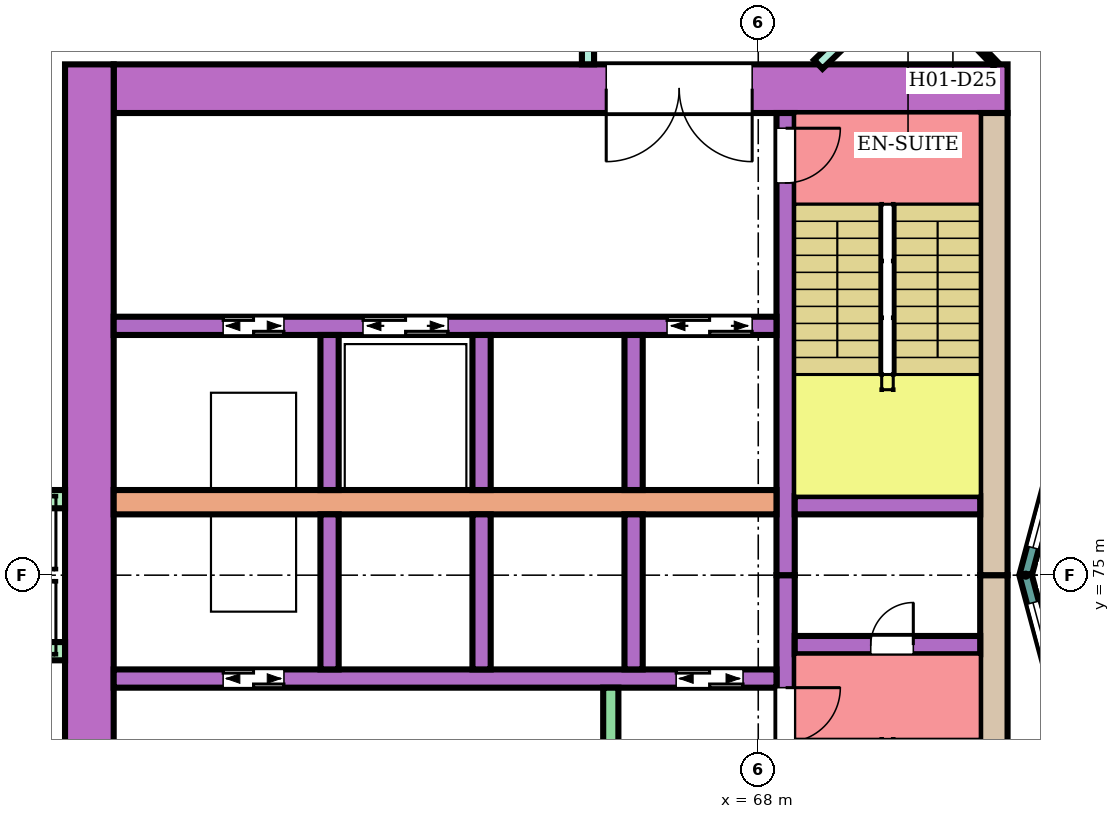
"""IFC4 building model, lengths in metres.
Left out: names, types, materials, properties, quantities, classifications, styles, units other than length and angle.
Written with IfcOpenShell. Run it as: python <this file> out.ifc"""

import sys

from ifc_helpers import new_model, si_unit, direction, frame, frame_2d, origin, place, context, subcontext, project, spatial, rectangle, extrude, element, fill, save


model = new_model("IFC4")
c1 = context("Model", 3, precision=1e-05, world=origin(), true_north=direction((0.0, 1.0)))
c2 = subcontext(c1, "Body", "Model", "MODEL_VIEW")
j1 = project(units=[si_unit("LENGTHUNIT", "METRE"), si_unit("PLANEANGLEUNIT", "RADIAN")], contexts=[c1])
p1 = place(None, origin())
s1 = spatial("IfcSite", under=j1, at=p1, CompositionType="ELEMENT")
p2 = place(p1, origin())
s2 = spatial("IfcBuilding", under=s1, at=p2, CompositionType="ELEMENT")
p3 = place(p2, frame((0.0, 0.0, 28.8)))
s3 = spatial("IfcBuildingStorey", under=s2, at=p3, CompositionType="ELEMENT", Elevation=28.8)
p4 = place(p3, frame((72.1, 83.0, 0.0), z_axis=(0.0, 0.0, 1.0), x_axis=(-1.0, 0.0, 0.0)))
e1 = element("IfcWall", 1, at=p4, inside=s3, PredefinedType="SHEAR", context=c2, shape_type="SweptSolid", body=[
    extrude(rectangle(XDim=14.7, YDim=0.8, at=frame_2d((7.35, 0.0))), origin(), (0.0, 0.0, 1.0), 3.48),
])
p5 = place(p4, frame((4.2, 0.0, 0.0)))
e2 = element("IfcOpeningElement", 2, at=p5, cuts=e1, PredefinedType="OPENING", context=c2, shape_type="SweptSolid", body=[
    extrude(rectangle(XDim=2.4, YDim=2.4, at=frame_2d((1.2, 1.2))), frame((0.0, 0.41, 0.0), z_axis=(0.0, -1.0, 0.0), x_axis=(1.0, 0.0, 0.0)), (0.0, 0.0, 1.0), 0.82),
])
for number, where, z_axis, x_axis in (
    (3, (71.875, 75.0, 0.0), (0.0, 0.0, 1.0), (0.0, -1.0, 0.0)),
    (4, (71.875, 82.6, 0.0), (0.0, 0.0, 1.0), (0.0, -1.0, 0.0)),
):
    element("IfcWall", number, at=place(p3, frame(where, z_axis=z_axis, x_axis=x_axis)), inside=s3, PredefinedType="SHEAR", context=c2, shape_type="SweptSolid", body=[
        extrude(rectangle(XDim=7.6, YDim=0.45, at=frame_2d((3.8, 0.0))), origin(), (0.0, 0.0, 1.0), 3.48),
    ])
p6 = place(p3, frame((57.0, 83.4, 0.0), z_axis=(0.0, 0.0, 1.0), x_axis=(0.0, -1.0, 0.0)))
e5 = element("IfcWall", 5, at=p6, inside=s3, PredefinedType="SHEAR", context=c2, shape_type="SweptSolid", body=[
    extrude(rectangle(XDim=16.8, YDim=0.8, at=frame_2d((8.4, 0.0))), origin(), (0.0, 0.0, 1.0), 3.48),
])
p7 = place(p3, frame((68.45, 75.0, 0.0), z_axis=(0.0, 0.0, 1.0), x_axis=(0.0, -1.0, 0.0)))
e6 = element("IfcWall", 6, at=p7, inside=s3, PredefinedType="SHEAR", context=c2, shape_type="SweptSolid", body=[
    extrude(rectangle(XDim=7.6, YDim=0.3, at=frame_2d((3.8, 0.0))), origin(), (0.0, 0.0, 1.0), 3.48),
])
p8 = place(p7, frame((1.85, 0.0, 0.0)))
e7 = element("IfcOpeningElement", 7, at=p8, cuts=e6, PredefinedType="OPENING", context=c2, shape_type="SweptSolid", body=[
    extrude(rectangle(XDim=0.9, YDim=2.1, at=frame_2d((0.45, 1.05))), frame((0.0, 0.16, 0.0), z_axis=(0.0, -1.0, 0.0), x_axis=(1.0, 0.0, 0.0)), (0.0, 0.0, 1.0), 0.32),
])
p9 = place(p3, frame((68.45, 82.6, 0.0), z_axis=(0.0, 0.0, 1.0), x_axis=(0.0, -1.0, 0.0)))
e8 = element("IfcWall", 8, at=p9, inside=s3, PredefinedType="SHEAR", context=c2, shape_type="SweptSolid", body=[
    extrude(rectangle(XDim=7.6, YDim=0.3, at=frame_2d((3.8, 0.0))), origin(), (0.0, 0.0, 1.0), 3.48),
])
p10 = place(p9, frame((0.25, 0.0, 0.0)))
e9 = element("IfcOpeningElement", 9, at=p10, cuts=e8, PredefinedType="OPENING", context=c2, shape_type="SweptSolid", body=[
    extrude(rectangle(XDim=0.9, YDim=2.1, at=frame_2d((0.45, 1.05))), frame((0.0, 0.16, 0.0), z_axis=(0.0, -1.0, 0.0), x_axis=(1.0, 0.0, 0.0)), (0.0, 0.0, 1.0), 0.32),
])
p11 = place(p3, frame((71.65, 73.85, 0.0), z_axis=(0.0, 0.0, 1.0), x_axis=(-1.0, 0.0, 0.0)))
e10 = element("IfcWall", 10, at=p11, inside=s3, PredefinedType="SHEAR", context=c2, shape_type="SweptSolid", body=[
    extrude(rectangle(XDim=3.05, YDim=0.3, at=frame_2d((1.525, 0.0))), origin(), (0.0, 0.0, 1.0), 3.48),
])
p12 = place(p11, frame((1.1, 0.0, 0.0)))
e11 = element("IfcOpeningElement", 11, at=p12, cuts=e10, PredefinedType="OPENING", context=c2, shape_type="SweptSolid", body=[
    extrude(rectangle(XDim=0.7, YDim=2.0, at=frame_2d((0.35, 1.0))), frame((0.0, 0.16, 0.0), z_axis=(0.0, -1.0, 0.0), x_axis=(1.0, 0.0, 0.0)), (0.0, 0.0, 1.0), 0.32),
])
p13 = place(p3, frame((71.65, 76.15, 0.0), z_axis=(0.0, 0.0, 1.0), x_axis=(-1.0, 0.0, 0.0)))
e12 = element("IfcWall", 12, at=p13, inside=s3, PredefinedType="SHEAR", context=c2, shape_type="SweptSolid", body=[
    extrude(rectangle(XDim=3.05, YDim=0.3, at=frame_2d((1.525, 0.0))), origin(), (0.0, 0.0, 1.0), 3.48),
])
p14 = place(p3, frame((68.3, 73.3, 0.0), z_axis=(0.0, 0.0, 1.0), x_axis=(-1.0, 0.0, 0.0)))
e13 = element("IfcWall", 13, at=p14, inside=s3, PredefinedType="SHEAR", context=c2, shape_type="SweptSolid", body=[
    extrude(rectangle(XDim=10.9, YDim=0.3, at=frame_2d((5.45, 0.0))), origin(), (0.0, 0.0, 1.0), 3.48),
])
p15 = place(p14, frame((0.55, 0.0, 0.0)))
e14 = element("IfcOpeningElement", 14, at=p15, cuts=e13, PredefinedType="OPENING", context=c2, shape_type="SweptSolid", body=[
    extrude(rectangle(XDim=1.1, YDim=2.1, at=frame_2d((0.55, 1.05))), frame((0.0, 0.16, 0.0), z_axis=(0.0, -1.0, 0.0), x_axis=(1.0, 0.0, 0.0)), (0.0, 0.0, 1.0), 0.32),
])
p16 = place(p14, frame((8.1, 0.0, 0.0)))
e15 = element("IfcOpeningElement", 15, at=p16, cuts=e13, PredefinedType="OPENING", context=c2, shape_type="SweptSolid", body=[
    extrude(rectangle(XDim=1.0, YDim=2.1, at=frame_2d((0.5, 1.05))), frame((0.0, 0.16, 0.0), z_axis=(0.0, -1.0, 0.0), x_axis=(1.0, 0.0, 0.0)), (0.0, 0.0, 1.0), 0.32),
])
p17 = place(p3, frame((68.3, 76.2, 0.0), z_axis=(0.0, 0.0, 1.0), x_axis=(-1.0, 0.0, 0.0)))
e16 = element("IfcWall", 16, at=p17, inside=s3, PredefinedType="SHEAR", context=c2, shape_type="SweptSolid", body=[
    extrude(rectangle(XDim=10.9, YDim=0.4, at=frame_2d((5.45, 0.0))), origin(), (0.0, 0.0, 1.0), 3.48),
])
p18 = place(p3, frame((68.3, 79.1, 0.0), z_axis=(0.0, 0.0, 1.0), x_axis=(-1.0, 0.0, 0.0)))
e17 = element("IfcWall", 17, at=p18, inside=s3, PredefinedType="SHEAR", context=c2, shape_type="SweptSolid", body=[
    extrude(rectangle(XDim=10.9, YDim=0.3, at=frame_2d((5.45, 0.0))), origin(), (0.0, 0.0, 1.0), 3.48),
])
p19 = place(p18, frame((0.4, 0.0, 0.0)))
e18 = element("IfcOpeningElement", 18, at=p19, cuts=e17, PredefinedType="OPENING", context=c2, shape_type="SweptSolid", body=[
    extrude(rectangle(XDim=1.4, YDim=2.1, at=frame_2d((0.7, 1.05))), frame((0.0, 0.16, 0.0), z_axis=(0.0, -1.0, 0.0), x_axis=(1.0, 0.0, 0.0)), (0.0, 0.0, 1.0), 0.32),
])
p20 = place(p18, frame((5.4, 0.0, 0.0)))
e19 = element("IfcOpeningElement", 19, at=p20, cuts=e17, PredefinedType="OPENING", context=c2, shape_type="SweptSolid", body=[
    extrude(rectangle(XDim=1.4, YDim=2.1, at=frame_2d((0.7, 1.05))), frame((0.0, 0.16, 0.0), z_axis=(0.0, -1.0, 0.0), x_axis=(1.0, 0.0, 0.0)), (0.0, 0.0, 1.0), 0.32),
])
p21 = place(p18, frame((8.1, 0.0, 0.0)))
e20 = element("IfcOpeningElement", 20, at=p21, cuts=e17, PredefinedType="OPENING", context=c2, shape_type="SweptSolid", body=[
    extrude(rectangle(XDim=1.0, YDim=2.1, at=frame_2d((0.5, 1.05))), frame((0.0, 0.16, 0.0), z_axis=(0.0, -1.0, 0.0), x_axis=(1.0, 0.0, 0.0)), (0.0, 0.0, 1.0), 0.32),
])
for number, where, z_axis, x_axis in (
    (21, (65.95, 76.0, 0.0), (0.0, 0.0, 1.0), (0.0, -1.0, 0.0)),
    (22, (63.45, 76.0, 0.0), (0.0, 0.0, 1.0), (0.0, -1.0, 0.0)),
    (23, (60.95, 76.0, 0.0), (0.0, 0.0, 1.0), (0.0, -1.0, 0.0)),
    (24, (65.95, 78.95, 0.0), (0.0, 0.0, 1.0), (0.0, -1.0, 0.0)),
    (25, (63.45, 78.95, 0.0), (0.0, 0.0, 1.0), (0.0, -1.0, 0.0)),
    (26, (60.95, 78.95, 0.0), (0.0, 0.0, 1.0), (0.0, -1.0, 0.0)),
):
    element("IfcWall", number, at=place(p3, frame(where, z_axis=z_axis, x_axis=x_axis)), inside=s3, PredefinedType="SHEAR", context=c2, shape_type="SweptSolid", body=[
        extrude(rectangle(XDim=2.55, YDim=0.3, at=frame_2d((1.275, 0.0))), origin(), (0.0, 0.0, 1.0), 3.48),
    ])
p22 = place(p3, frame((65.575, 73.15, 0.0), z_axis=(0.0, 0.0, 1.0), x_axis=(0.0, -1.0, 0.0)))
e27 = element("IfcWall", 27, at=p22, inside=s3, PredefinedType="SHEAR", context=c2, shape_type="SweptSolid", body=[
    extrude(rectangle(XDim=1.5, YDim=0.25, at=frame_2d((0.75, 0.0))), origin(), (0.0, 0.0, 1.0), 3.48),
])
p23 = place(p3, frame((57.571, 87.949, 0.0), z_axis=(0.0, 0.0, 1.0), x_axis=(-0.382694096902, -0.923875115043, 0.0)))
e28 = element("IfcWall", 28, at=p23, inside=s3, PredefinedType="NOTDEFINED", context=c2, shape_type="SweptSolid", body=[
    extrude(rectangle(XDim=6.761, YDim=0.2, at=frame_2d((3.38, 0.0))), origin(), (0.0, 0.0, 1.0), 3.8),
])
p24 = place(p23, frame((0.527, 0.0, 0.9)))
e29 = element("IfcOpeningElement", 29, at=p24, cuts=e28, PredefinedType="OPENING", context=c2, shape_type="SweptSolid", body=[
    extrude(rectangle(XDim=1.2, YDim=2.4, at=frame_2d((0.6, 1.2))), frame((0.0, 0.11, 0.0), z_axis=(0.0, -1.0, 0.0), x_axis=(1.0, 0.0, 0.0)), (0.0, 0.0, 1.0), 0.22),
])
p25 = place(p23, frame((2.48, 0.0, 0.0)))
e30 = element("IfcOpeningElement", 30, at=p25, cuts=e28, PredefinedType="OPENING", context=c2, shape_type="SweptSolid", body=[
    extrude(rectangle(XDim=1.8, YDim=2.4, at=frame_2d((0.9, 1.2))), frame((0.0, 0.11, 0.0), z_axis=(0.0, -1.0, 0.0), x_axis=(1.0, 0.0, 0.0)), (0.0, 0.0, 1.0), 0.22),
])
p26 = place(p23, frame((5.034, 0.0, 0.9)))
e31 = element("IfcOpeningElement", 31, at=p26, cuts=e28, PredefinedType="OPENING", context=c2, shape_type="SweptSolid", body=[
    extrude(rectangle(XDim=1.2, YDim=2.4, at=frame_2d((0.6, 1.2))), frame((0.0, 0.11, 0.0), z_axis=(0.0, -1.0, 0.0), x_axis=(1.0, 0.0, 0.0)), (0.0, 0.0, 1.0), 0.22),
])
for number, where, z_axis, x_axis in (
    (32, (56.6, 76.25, 0.0), (0.0, 0.0, 1.0), (-1.0, 0.0, 0.0)),
    (33, (56.6, 73.75, 0.0), (0.0, 0.0, 1.0), (-1.0, 0.0, 0.0)),
):
    element("IfcWall", number, at=place(p3, frame(where, z_axis=z_axis, x_axis=x_axis)), inside=s3, PredefinedType="NOTDEFINED", context=c2, shape_type="SweptSolid", body=[
        extrude(rectangle(XDim=2.416, YDim=0.3, at=frame_2d((1.208, 0.0))), origin(), (0.0, 0.0, 1.0), 3.8),
    ])
p27 = place(p3, frame((73.415, 78.802, 0.0), z_axis=(0.0, 0.0, 1.0), x_axis=(-0.258789828301, -0.965933654434, 0.0)))
e34 = element("IfcWall", 34, at=p27, inside=s3, PredefinedType="NOTDEFINED", context=c2, shape_type="SweptSolid", body=[
    extrude(rectangle(XDim=3.936, YDim=0.2, at=frame_2d((1.968, 0.0))), origin(), (0.0, 0.0, 1.0), 3.8),
])
p28 = place(p27, frame((0.468, 0.0, 0.9)))
e35 = element("IfcOpeningElement", 35, at=p28, cuts=e34, PredefinedType="OPENING", context=c2, shape_type="SweptSolid", body=[
    extrude(rectangle(XDim=3.0, YDim=2.3, at=frame_2d((1.5, 1.15))), frame((0.0, 0.11, 0.0), z_axis=(0.0, -1.0, 0.0), x_axis=(1.0, 0.0, 0.0)), (0.0, 0.0, 1.0), 0.22),
])
p29 = place(p3, frame((72.396, 75.0, 0.0), z_axis=(0.0, 0.0, 1.0), x_axis=(0.258789828301, -0.965933654434, 0.0)))
e36 = element("IfcWall", 36, at=p29, inside=s3, PredefinedType="NOTDEFINED", context=c2, shape_type="SweptSolid", body=[
    extrude(rectangle(XDim=3.936, YDim=0.2, at=frame_2d((1.968, 0.0))), origin(), (0.0, 0.0, 1.0), 3.8),
])
p30 = place(p29, frame((0.468, 0.0, 0.9)))
e37 = element("IfcOpeningElement", 37, at=p30, cuts=e36, PredefinedType="OPENING", context=c2, shape_type="SweptSolid", body=[
    extrude(rectangle(XDim=3.0, YDim=2.3, at=frame_2d((1.5, 1.15))), frame((0.0, 0.11, 0.0), z_axis=(0.0, -1.0, 0.0), x_axis=(1.0, 0.0, 0.0)), (0.0, 0.0, 1.0), 0.22),
])
p31 = place(p3, frame((65.2, 83.401, 0.0), z_axis=(0.0, 0.0, 1.0), x_axis=(0.0, 1.0, 0.0)))
e38 = element("IfcWall", 38, at=p31, inside=s3, PredefinedType="PARTITIONING", context=c2, shape_type="SweptSolid", body=[
    extrude(rectangle(XDim=1.399, YDim=0.2, at=frame_2d((0.7, 0.0))), origin(), (0.0, 0.0, 1.0), 3.35),
])
p32 = place(p3, frame((68.987, 83.4, 0.0), z_axis=(0.0, 0.0, 1.0), x_axis=(0.719591503389, 0.694397629784, 0.0)))
e39 = element("IfcWall", 39, at=p32, inside=s3, PredefinedType="PARTITIONING", context=c2, shape_type="SweptSolid", body=[
    extrude(rectangle(XDim=5.378, YDim=0.2, at=frame_2d((2.689, 0.0))), origin(), (0.0, 0.0, 1.0), 3.35),
])
p33 = place(p32, frame((3.938, 0.0, 0.0)))
e40 = element("IfcOpeningElement", 40, at=p33, cuts=e39, PredefinedType="OPENING", context=c2, shape_type="SweptSolid", body=[
    extrude(rectangle(XDim=1.0, YDim=2.1, at=frame_2d((0.5, 1.05))), frame((0.0, 0.11, 0.0), z_axis=(0.0, -1.0, 0.0), x_axis=(1.0, 0.0, 0.0)), (0.0, 0.0, 1.0), 0.22),
])
p34 = place(p3, frame((70.567, 84.786, 0.0), z_axis=(0.0, 0.0, 1.0), x_axis=(0.694447472534, -0.719543402368, 0.0)))
e41 = element("IfcWall", 41, at=p34, inside=s3, PredefinedType="PARTITIONING", context=c2, shape_type="SweptSolid", body=[
    extrude(rectangle(XDim=1.926, YDim=0.1, at=frame_2d((0.963, 0.0))), origin(), (0.0, 0.0, 1.0), 3.35),
])
p35 = place(p34, frame((0.513, 0.0, 0.0)))
e42 = element("IfcOpeningElement", 42, at=p35, cuts=e41, PredefinedType="OPENING", context=c2, shape_type="SweptSolid", body=[
    extrude(rectangle(XDim=0.8, YDim=2.1, at=frame_2d((0.4, 1.05))), frame((0.0, 0.06, 0.0), z_axis=(0.0, -1.0, 0.0), x_axis=(1.0, 0.0, 0.0)), (0.0, 0.0, 1.0), 0.12),
])
p36 = place(p28, origin())
e43 = element("IfcWindow", 43, at=p36, inside=s3, PartitioningType="SINGLE_PANEL", PredefinedType="WINDOW", context=c2, shape_type="SweptSolid", body=[
    extrude(rectangle(XDim=3.0, YDim=2.3, at=frame_2d((1.5, 1.15))), frame((0.0, 0.03, 0.0), z_axis=(0.0, -1.0, 0.0), x_axis=(1.0, 0.0, 0.0)), (0.0, 0.0, 1.0), 0.06),
])
fill(e35, e43)
p37 = place(p30, origin())
e44 = element("IfcWindow", 44, at=p37, inside=s3, PartitioningType="SINGLE_PANEL", PredefinedType="WINDOW", context=c2, shape_type="SweptSolid", body=[
    extrude(rectangle(XDim=3.0, YDim=2.3, at=frame_2d((1.5, 1.15))), frame((0.0, 0.03, 0.0), z_axis=(0.0, -1.0, 0.0), x_axis=(1.0, 0.0, 0.0)), (0.0, 0.0, 1.0), 0.06),
])
fill(e37, e44)
p38 = place(p12, frame((0.7, 0.0, 0.0), z_axis=(0.0, 0.0, 1.0), x_axis=(-1.0, 0.0, 0.0)))
e45 = element("IfcDoor", 45, at=p38, inside=s3, OperationType="SINGLE_SWING_RIGHT", PredefinedType="DOOR", context=c2, shape_type="SweptSolid", body=[
    extrude(rectangle(XDim=0.7, YDim=2.0, at=frame_2d((0.35, 1.0))), frame((0.0, 0.025, 0.0), z_axis=(0.0, -1.0, 0.0), x_axis=(1.0, 0.0, 0.0)), (0.0, 0.0, 1.0), 0.05),
])
fill(e11, e45)
p39 = place(p8, origin())
e46 = element("IfcDoor", 46, at=p39, inside=s3, OperationType="SINGLE_SWING_LEFT", PredefinedType="DOOR", context=c2, shape_type="SweptSolid", body=[
    extrude(rectangle(XDim=0.9, YDim=2.1, at=frame_2d((0.45, 1.05))), frame((0.0, 0.025, 0.0), z_axis=(0.0, -1.0, 0.0), x_axis=(1.0, 0.0, 0.0)), (0.0, 0.0, 1.0), 0.05),
])
fill(e7, e46)
p40 = place(p10, origin())
e47 = element("IfcDoor", 47, at=p40, inside=s3, OperationType="SINGLE_SWING_LEFT", PredefinedType="DOOR", context=c2, shape_type="SweptSolid", body=[
    extrude(rectangle(XDim=0.9, YDim=2.1, at=frame_2d((0.45, 1.05))), frame((0.0, 0.025, 0.0), z_axis=(0.0, -1.0, 0.0), x_axis=(1.0, 0.0, 0.0)), (0.0, 0.0, 1.0), 0.05),
])
fill(e9, e47)
p41 = place(p15, origin())
e48 = element("IfcDoor", 48, at=p41, inside=s3, OperationType="DOUBLE_DOOR_SLIDING", PredefinedType="DOOR", context=c2, shape_type="SweptSolid", body=[
    extrude(rectangle(XDim=1.1, YDim=2.1, at=frame_2d((0.55, 1.05))), frame((0.0, 0.025, 0.0), z_axis=(0.0, -1.0, 0.0), x_axis=(1.0, 0.0, 0.0)), (0.0, 0.0, 1.0), 0.05),
])
fill(e14, e48)
p42 = place(p16, origin())
e49 = element("IfcDoor", 49, at=p42, inside=s3, OperationType="DOUBLE_DOOR_SLIDING", PredefinedType="DOOR", context=c2, shape_type="SweptSolid", body=[
    extrude(rectangle(XDim=1.0, YDim=2.1, at=frame_2d((0.5, 1.05))), frame((0.0, 0.025, 0.0), z_axis=(0.0, -1.0, 0.0), x_axis=(1.0, 0.0, 0.0)), (0.0, 0.0, 1.0), 0.05),
])
fill(e15, e49)
p43 = place(p19, origin())
e50 = element("IfcDoor", 50, at=p43, inside=s3, OperationType="DOUBLE_DOOR_SLIDING", PredefinedType="DOOR", context=c2, shape_type="SweptSolid", body=[
    extrude(rectangle(XDim=1.4, YDim=2.1, at=frame_2d((0.7, 1.05))), frame((0.0, 0.025, 0.0), z_axis=(0.0, -1.0, 0.0), x_axis=(1.0, 0.0, 0.0)), (0.0, 0.0, 1.0), 0.05),
])
fill(e18, e50)
p44 = place(p20, origin())
e51 = element("IfcDoor", 51, at=p44, inside=s3, OperationType="DOUBLE_DOOR_SLIDING", PredefinedType="DOOR", context=c2, shape_type="SweptSolid", body=[
    extrude(rectangle(XDim=1.4, YDim=2.1, at=frame_2d((0.7, 1.05))), frame((0.0, 0.025, 0.0), z_axis=(0.0, -1.0, 0.0), x_axis=(1.0, 0.0, 0.0)), (0.0, 0.0, 1.0), 0.05),
])
fill(e19, e51)
p45 = place(p21, origin())
e52 = element("IfcDoor", 52, at=p45, inside=s3, OperationType="DOUBLE_DOOR_SLIDING", PredefinedType="DOOR", context=c2, shape_type="SweptSolid", body=[
    extrude(rectangle(XDim=1.0, YDim=2.1, at=frame_2d((0.5, 1.05))), frame((0.0, 0.025, 0.0), z_axis=(0.0, -1.0, 0.0), x_axis=(1.0, 0.0, 0.0)), (0.0, 0.0, 1.0), 0.05),
])
fill(e20, e52)
p46 = place(p5, origin())
e53 = element("IfcDoor", 53, at=p46, inside=s3, OperationType="DOUBLE_DOOR_SINGLE_SWING", PredefinedType="DOOR", context=c2, shape_type="SweptSolid", body=[
    extrude(rectangle(XDim=2.4, YDim=2.4, at=frame_2d((1.2, 1.2))), frame((0.0, 0.025, 0.0), z_axis=(0.0, -1.0, 0.0), x_axis=(1.0, 0.0, 0.0)), (0.0, 0.0, 1.0), 0.05),
])
fill(e2, e53)
save(model, sys.argv[1])
